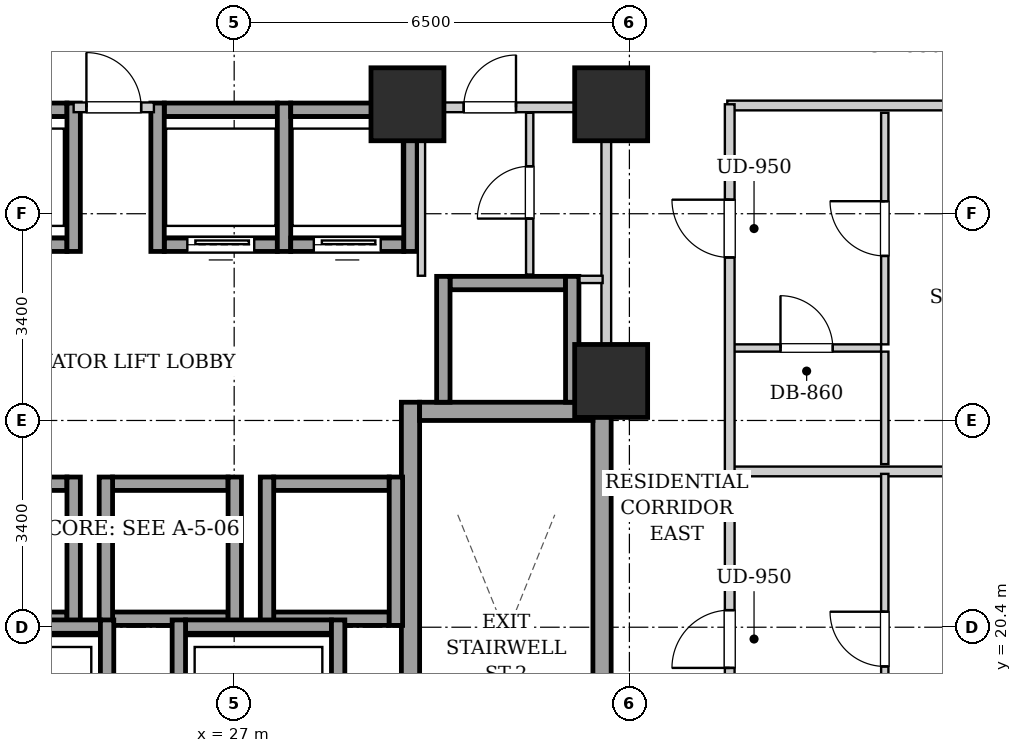
"""IFC4 building model, lengths in metres.
Left out: names, types, materials, properties, quantities, classifications, styles, units other than length and angle.
Written with IfcOpenShell. Run it as: python <this file> out.ifc"""

import sys

from ifc_helpers import new_model, si_unit, direction, frame, frame_2d, origin, origin_2d, place, context, subcontext, project, spatial, rectangle, extrude, element, fill, save


model = new_model("IFC4")
c1 = context("Model", 3, precision=1e-05, world=origin(), true_north=direction((0.0, 1.0)))
c2 = subcontext(c1, "Body", "Model", "MODEL_VIEW")
j1 = project(units=[si_unit("LENGTHUNIT", "METRE"), si_unit("PLANEANGLEUNIT", "RADIAN")], contexts=[c1])
p1 = place(None, origin())
s1 = spatial("IfcSite", under=j1, at=p1, CompositionType="ELEMENT")
p2 = place(p1, origin())
s2 = spatial("IfcBuilding", under=s1, at=p2, CompositionType="ELEMENT")
p3 = place(p2, frame((0.0, 0.0, 51.4)))
s3 = spatial("IfcBuildingStorey", under=s2, at=p3, CompositionType="ELEMENT", Elevation=51.4)
for number, where, z_axis, x_axis in (
    (1, (29.85, 29.0, 0.0), (0.0, 0.0, 1.0), (1.0, 0.0, 0.0)),
    (2, (33.2, 29.0, 0.0), (0.0, 0.0, 1.0), (1.0, 0.0, 0.0)),
    (3, (33.2, 24.45, 0.0), (0.0, 0.0, 1.0), (1.0, 0.0, 0.0)),
):
    element("IfcColumn", number, at=place(p3, frame(where, z_axis=z_axis, x_axis=x_axis)), inside=s3, PredefinedType="COLUMN", context=c2, shape_type="SweptSolid", body=[
        extrude(rectangle(XDim=1.2, YDim=1.2, at=origin_2d()), origin(), (0.0, 0.0, 1.0), 3.2),
    ])
for number, where, z_axis, x_axis in (
    (4, (29.9, 15.1, 0.0), (0.0, 0.0, 1.0), (0.0, 1.0, 0.0)),
    (5, (33.05, 15.1, 0.0), (0.0, 0.0, 1.0), (0.0, 1.0, 0.0)),
):
    element("IfcWall", number, at=place(p3, frame(where, z_axis=z_axis, x_axis=x_axis)), inside=s3, PredefinedType="SHEAR", context=c2, shape_type="SweptSolid", body=[
        extrude(rectangle(XDim=9.0, YDim=0.3, at=frame_2d((4.5, 0.0))), origin(), (0.0, 0.0, 1.0), 2.94),
    ])
p4 = place(p3, frame((30.05, 23.95, 0.0), z_axis=(0.0, 0.0, 1.0), x_axis=(1.0, 0.0, 0.0)))
e6 = element("IfcWall", 6, at=p4, inside=s3, PredefinedType="SHEAR", context=c2, shape_type="SweptSolid", body=[
    extrude(rectangle(XDim=2.85, YDim=0.3, at=frame_2d((1.425, 0.0))), origin(), (0.0, 0.0, 1.0), 2.94),
])
p5 = place(p3, frame((22.35, 26.69, 0.0), z_axis=(0.0, 0.0, 1.0), x_axis=(1.0, 0.0, 0.0)))
e7 = element("IfcWall", 7, at=p5, inside=s3, PredefinedType="SHEAR", context=c2, shape_type="SweptSolid", body=[
    extrude(rectangle(XDim=1.9, YDim=0.22, at=frame_2d((0.95, 0.0))), origin(), (0.0, 0.0, 1.0), 2.94),
])
p6 = place(p5, frame((0.4, 0.0, 0.0)))
e8 = element("IfcOpeningElement", 8, at=p6, cuts=e7, PredefinedType="OPENING", context=c2, shape_type="SweptSolid", body=[
    extrude(rectangle(XDim=1.1, YDim=2.15, at=frame_2d((0.55, 1.075))), frame((0.0, 0.12, 0.0), z_axis=(0.0, -1.0, 0.0), x_axis=(1.0, 0.0, 0.0)), (0.0, 0.0, 1.0), 0.24),
])
p7 = place(p3, frame((22.35, 28.91, 0.0), z_axis=(0.0, 0.0, 1.0), x_axis=(1.0, 0.0, 0.0)))
e9 = element("IfcWall", 9, at=p7, inside=s3, PredefinedType="SHEAR", context=c2, shape_type="SweptSolid", body=[
    extrude(rectangle(XDim=1.9, YDim=0.22, at=frame_2d((0.95, 0.0))), origin(), (0.0, 0.0, 1.0), 2.94),
])
p8 = place(p3, frame((24.36, 26.58, 0.0), z_axis=(0.0, 0.0, 1.0), x_axis=(0.0, 1.0, 0.0)))
e10 = element("IfcWall", 10, at=p8, inside=s3, PredefinedType="SHEAR", context=c2, shape_type="SweptSolid", body=[
    extrude(rectangle(XDim=2.44, YDim=0.22, at=frame_2d((1.22, 0.0))), origin(), (0.0, 0.0, 1.0), 2.94),
])
p9 = place(p3, frame((25.85, 26.69, 0.0), z_axis=(0.0, 0.0, 1.0), x_axis=(1.0, 0.0, 0.0)))
e11 = element("IfcWall", 11, at=p9, inside=s3, PredefinedType="SHEAR", context=c2, shape_type="SweptSolid", body=[
    extrude(rectangle(XDim=1.86, YDim=0.22, at=frame_2d((0.93, 0.0))), origin(), (0.0, 0.0, 1.0), 2.94),
])
p10 = place(p9, frame((0.38, 0.0, 0.0)))
e12 = element("IfcOpeningElement", 12, at=p10, cuts=e11, PredefinedType="OPENING", context=c2, shape_type="SweptSolid", body=[
    extrude(rectangle(XDim=1.1, YDim=2.15, at=frame_2d((0.55, 1.075))), frame((0.0, 0.12, 0.0), z_axis=(0.0, -1.0, 0.0), x_axis=(1.0, 0.0, 0.0)), (0.0, 0.0, 1.0), 0.24),
])
p11 = place(p3, frame((25.85, 28.91, 0.0), z_axis=(0.0, 0.0, 1.0), x_axis=(1.0, 0.0, 0.0)))
e13 = element("IfcWall", 13, at=p11, inside=s3, PredefinedType="SHEAR", context=c2, shape_type="SweptSolid", body=[
    extrude(rectangle(XDim=1.86, YDim=0.22, at=frame_2d((0.93, 0.0))), origin(), (0.0, 0.0, 1.0), 2.94),
])
for number, where, z_axis, x_axis in (
    (14, (25.74, 26.58, 0.0), (0.0, 0.0, 1.0), (0.0, 1.0, 0.0)),
    (15, (27.82, 26.58, 0.0), (0.0, 0.0, 1.0), (0.0, 1.0, 0.0)),
):
    element("IfcWall", number, at=place(p3, frame(where, z_axis=z_axis, x_axis=x_axis)), inside=s3, PredefinedType="SHEAR", context=c2, shape_type="SweptSolid", body=[
        extrude(rectangle(XDim=2.44, YDim=0.22, at=frame_2d((1.22, 0.0))), origin(), (0.0, 0.0, 1.0), 2.94),
    ])
p12 = place(p3, frame((27.93, 26.69, 0.0), z_axis=(0.0, 0.0, 1.0), x_axis=(1.0, 0.0, 0.0)))
e16 = element("IfcWall", 16, at=p12, inside=s3, PredefinedType="SHEAR", context=c2, shape_type="SweptSolid", body=[
    extrude(rectangle(XDim=1.86, YDim=0.22, at=frame_2d((0.93, 0.0))), origin(), (0.0, 0.0, 1.0), 2.94),
])
p13 = place(p12, frame((0.38, 0.0, 0.0)))
e17 = element("IfcOpeningElement", 17, at=p13, cuts=e16, PredefinedType="OPENING", context=c2, shape_type="SweptSolid", body=[
    extrude(rectangle(XDim=1.1, YDim=2.15, at=frame_2d((0.55, 1.075))), frame((0.0, 0.12, 0.0), z_axis=(0.0, -1.0, 0.0), x_axis=(1.0, 0.0, 0.0)), (0.0, 0.0, 1.0), 0.24),
])
p14 = place(p3, frame((27.93, 28.91, 0.0), z_axis=(0.0, 0.0, 1.0), x_axis=(1.0, 0.0, 0.0)))
e18 = element("IfcWall", 18, at=p14, inside=s3, PredefinedType="SHEAR", context=c2, shape_type="SweptSolid", body=[
    extrude(rectangle(XDim=1.86, YDim=0.22, at=frame_2d((0.93, 0.0))), origin(), (0.0, 0.0, 1.0), 2.94),
])
p15 = place(p3, frame((29.9, 26.58, 0.0), z_axis=(0.0, 0.0, 1.0), x_axis=(0.0, 1.0, 0.0)))
e19 = element("IfcWall", 19, at=p15, inside=s3, PredefinedType="SHEAR", context=c2, shape_type="SweptSolid", body=[
    extrude(rectangle(XDim=2.44, YDim=0.22, at=frame_2d((1.22, 0.0))), origin(), (0.0, 0.0, 1.0), 2.94),
])
for number, where, z_axis, x_axis in (
    (20, (22.35, 20.54, 0.0), (0.0, 0.0, 1.0), (1.0, 0.0, 0.0)),
    (21, (22.35, 22.76, 0.0), (0.0, 0.0, 1.0), (1.0, 0.0, 0.0)),
):
    element("IfcWall", number, at=place(p3, frame(where, z_axis=z_axis, x_axis=x_axis)), inside=s3, PredefinedType="SHEAR", context=c2, shape_type="SweptSolid", body=[
        extrude(rectangle(XDim=1.9, YDim=0.22, at=frame_2d((0.95, 0.0))), origin(), (0.0, 0.0, 1.0), 2.94),
    ])
p16 = place(p3, frame((24.36, 20.43, 0.0), z_axis=(0.0, 0.0, 1.0), x_axis=(0.0, 1.0, 0.0)))
e22 = element("IfcWall", 22, at=p16, inside=s3, PredefinedType="SHEAR", context=c2, shape_type="SweptSolid", body=[
    extrude(rectangle(XDim=2.44, YDim=0.22, at=frame_2d((1.22, 0.0))), origin(), (0.0, 0.0, 1.0), 2.94),
])
for number, where, z_axis, x_axis in (
    (23, (25.0, 20.54, 0.0), (0.0, 0.0, 1.0), (1.0, 0.0, 0.0)),
    (24, (25.0, 22.76, 0.0), (0.0, 0.0, 1.0), (1.0, 0.0, 0.0)),
):
    element("IfcWall", number, at=place(p3, frame(where, z_axis=z_axis, x_axis=x_axis)), inside=s3, PredefinedType="SHEAR", context=c2, shape_type="SweptSolid", body=[
        extrude(rectangle(XDim=1.9, YDim=0.22, at=frame_2d((0.95, 0.0))), origin(), (0.0, 0.0, 1.0), 2.94),
    ])
for number, where, z_axis, x_axis in (
    (25, (24.89, 20.43, 0.0), (0.0, 0.0, 1.0), (0.0, 1.0, 0.0)),
    (26, (27.01, 20.43, 0.0), (0.0, 0.0, 1.0), (0.0, 1.0, 0.0)),
):
    element("IfcWall", number, at=place(p3, frame(where, z_axis=z_axis, x_axis=x_axis)), inside=s3, PredefinedType="SHEAR", context=c2, shape_type="SweptSolid", body=[
        extrude(rectangle(XDim=2.44, YDim=0.22, at=frame_2d((1.22, 0.0))), origin(), (0.0, 0.0, 1.0), 2.94),
    ])
for number, where, z_axis, x_axis in (
    (27, (27.65, 20.54, 0.0), (0.0, 0.0, 1.0), (1.0, 0.0, 0.0)),
    (28, (27.65, 22.76, 0.0), (0.0, 0.0, 1.0), (1.0, 0.0, 0.0)),
):
    element("IfcWall", number, at=place(p3, frame(where, z_axis=z_axis, x_axis=x_axis)), inside=s3, PredefinedType="SHEAR", context=c2, shape_type="SweptSolid", body=[
        extrude(rectangle(XDim=1.9, YDim=0.22, at=frame_2d((0.95, 0.0))), origin(), (0.0, 0.0, 1.0), 2.94),
    ])
for number, where, z_axis, x_axis in (
    (29, (27.54, 20.43, 0.0), (0.0, 0.0, 1.0), (0.0, 1.0, 0.0)),
    (30, (29.66, 20.43, 0.0), (0.0, 0.0, 1.0), (0.0, 1.0, 0.0)),
):
    element("IfcWall", number, at=place(p3, frame(where, z_axis=z_axis, x_axis=x_axis)), inside=s3, PredefinedType="SHEAR", context=c2, shape_type="SweptSolid", body=[
        extrude(rectangle(XDim=2.44, YDim=0.22, at=frame_2d((1.22, 0.0))), origin(), (0.0, 0.0, 1.0), 2.94),
    ])
p17 = place(p3, frame((30.55, 26.06, 0.0), z_axis=(0.0, 0.0, 1.0), x_axis=(1.0, 0.0, 0.0)))
e31 = element("IfcWall", 31, at=p17, inside=s3, PredefinedType="SHEAR", context=c2, shape_type="SweptSolid", body=[
    extrude(rectangle(XDim=1.9, YDim=0.22, at=frame_2d((0.95, 0.0))), origin(), (0.0, 0.0, 1.0), 2.94),
])
for number, where, z_axis, x_axis in (
    (32, (30.44, 24.1, 0.0), (0.0, 0.0, 1.0), (0.0, 1.0, 0.0)),
    (33, (32.56, 24.1, 0.0), (0.0, 0.0, 1.0), (0.0, 1.0, 0.0)),
):
    element("IfcWall", number, at=place(p3, frame(where, z_axis=z_axis, x_axis=x_axis)), inside=s3, PredefinedType="SHEAR", context=c2, shape_type="SweptSolid", body=[
        extrude(rectangle(XDim=2.07, YDim=0.22, at=frame_2d((1.035, 0.0))), origin(), (0.0, 0.0, 1.0), 2.94),
    ])
p18 = place(p3, frame((22.4, 20.41, 0.0), z_axis=(0.0, 0.0, 1.0), x_axis=(1.0, 0.0, 0.0)))
e34 = element("IfcWall", 34, at=p18, inside=s3, PredefinedType="SHEAR", context=c2, shape_type="SweptSolid", body=[
    extrude(rectangle(XDim=2.4, YDim=0.22, at=frame_2d((1.2, 0.0))), origin(), (0.0, 0.0, 1.0), 2.94),
])
p19 = place(p3, frame((24.91, 17.98, 0.0), z_axis=(0.0, 0.0, 1.0), x_axis=(0.0, 1.0, 0.0)))
e35 = element("IfcWall", 35, at=p19, inside=s3, PredefinedType="SHEAR", context=c2, shape_type="SweptSolid", body=[
    extrude(rectangle(XDim=2.54, YDim=0.22, at=frame_2d((1.27, 0.0))), origin(), (0.0, 0.0, 1.0), 2.94),
])
p20 = place(p3, frame((26.2, 20.41, 0.0), z_axis=(0.0, 0.0, 1.0), x_axis=(1.0, 0.0, 0.0)))
e36 = element("IfcWall", 36, at=p20, inside=s3, PredefinedType="SHEAR", context=c2, shape_type="SweptSolid", body=[
    extrude(rectangle(XDim=2.4, YDim=0.22, at=frame_2d((1.2, 0.0))), origin(), (0.0, 0.0, 1.0), 2.94),
])
for number, where, z_axis, x_axis in (
    (37, (26.09, 17.98, 0.0), (0.0, 0.0, 1.0), (0.0, 1.0, 0.0)),
    (38, (28.71, 17.98, 0.0), (0.0, 0.0, 1.0), (0.0, 1.0, 0.0)),
):
    element("IfcWall", number, at=place(p3, frame(where, z_axis=z_axis, x_axis=x_axis)), inside=s3, PredefinedType="SHEAR", context=c2, shape_type="SweptSolid", body=[
        extrude(rectangle(XDim=2.54, YDim=0.22, at=frame_2d((1.27, 0.0))), origin(), (0.0, 0.0, 1.0), 2.94),
    ])
p21 = place(p3, frame((33.12, 24.12, 0.0), z_axis=(0.0, 0.0, 1.0), x_axis=(0.0, 1.0, 0.0)))
e39 = element("IfcWall", 39, at=p21, inside=s3, PredefinedType="PARTITIONING", context=c2, shape_type="SweptSolid", body=[
    extrude(rectangle(XDim=4.76, YDim=0.16, at=frame_2d((2.38, 0.0))), origin(), (0.0, 0.0, 1.0), 2.94),
])
p22 = place(p3, frame((24.36, 28.95, 0.0), z_axis=(0.0, 0.0, 1.0), x_axis=(1.0, 0.0, 0.0)))
e40 = element("IfcWall", 40, at=p22, inside=s3, PredefinedType="PARTITIONING", context=c2, shape_type="SweptSolid", body=[
    extrude(rectangle(XDim=1.32, YDim=0.16, at=frame_2d((0.66, 0.0))), origin(), (0.0, 0.0, 1.0), 2.232),
])
p23 = place(p22, frame((0.21, 0.0, 0.0)))
e41 = element("IfcOpeningElement", 41, at=p23, cuts=e40, PredefinedType="OPENING", context=c2, shape_type="SweptSolid", body=[
    extrude(rectangle(XDim=0.9, YDim=2.05, at=frame_2d((0.45, 1.025))), frame((0.0, 0.09, 0.0), z_axis=(0.0, -1.0, 0.0), x_axis=(1.0, 0.0, 0.0)), (0.0, 0.0, 1.0), 0.18),
])
p24 = place(p3, frame((30.08, 26.18, 0.0), z_axis=(0.0, 0.0, 1.0), x_axis=(0.0, 1.0, 0.0)))
e42 = element("IfcWall", 42, at=p24, inside=s3, PredefinedType="PARTITIONING", context=c2, shape_type="SweptSolid", body=[
    extrude(rectangle(XDim=2.68, YDim=0.12, at=frame_2d((1.34, 0.0))), origin(), (0.0, 0.0, 1.0), 2.94),
])
p25 = place(p3, frame((32.68, 26.12, 0.0), z_axis=(0.0, 0.0, 1.0), x_axis=(1.0, 0.0, 0.0)))
e43 = element("IfcWall", 43, at=p25, inside=s3, PredefinedType="PARTITIONING", context=c2, shape_type="SweptSolid", body=[
    extrude(rectangle(XDim=0.38, YDim=0.12, at=frame_2d((0.19, 0.0))), origin(), (0.0, 0.0, 1.0), 2.94),
])
p26 = place(p3, frame((31.86, 26.2, 0.0), z_axis=(0.0, 0.0, 1.0), x_axis=(0.0, 1.0, 0.0)))
e44 = element("IfcWall", 44, at=p26, inside=s3, PredefinedType="PARTITIONING", context=c2, shape_type="SweptSolid", body=[
    extrude(rectangle(XDim=2.66, YDim=0.12, at=frame_2d((1.33, 0.0))), origin(), (0.0, 0.0, 1.0), 2.94),
])
p27 = place(p26, frame((0.92, 0.0, 0.0)))
e45 = element("IfcOpeningElement", 45, at=p27, cuts=e44, PredefinedType="OPENING", context=c2, shape_type="SweptSolid", body=[
    extrude(rectangle(XDim=0.86, YDim=2.05, at=frame_2d((0.43, 1.025))), frame((0.0, 0.07, 0.0), z_axis=(0.0, -1.0, 0.0), x_axis=(1.0, 0.0, 0.0)), (0.0, 0.0, 1.0), 0.14),
])
p28 = place(p3, frame((30.08, 28.95, 0.0), z_axis=(0.0, 0.0, 1.0), x_axis=(1.0, 0.0, 0.0)))
e46 = element("IfcWall", 46, at=p28, inside=s3, PredefinedType="PARTITIONING", context=c2, shape_type="SweptSolid", body=[
    extrude(rectangle(XDim=2.96, YDim=0.16, at=frame_2d((1.48, 0.0))), origin(), (0.0, 0.0, 1.0), 2.94),
])
p29 = place(p28, frame((0.695, 0.0, 0.0)))
e47 = element("IfcOpeningElement", 47, at=p29, cuts=e46, PredefinedType="OPENING", context=c2, shape_type="SweptSolid", body=[
    extrude(rectangle(XDim=0.86, YDim=2.05, at=frame_2d((0.43, 1.025))), frame((0.0, 0.09, 0.0), z_axis=(0.0, -1.0, 0.0), x_axis=(1.0, 0.0, 0.0)), (0.0, 0.0, 1.0), 0.18),
])
p30 = place(p3, frame((35.11, 28.98, 0.0), z_axis=(0.0, 0.0, 1.0), x_axis=(1.0, 0.0, 0.0)))
e48 = element("IfcWall", 48, at=p30, inside=s3, PredefinedType="PARTITIONING", context=c2, shape_type="SweptSolid", body=[
    extrude(rectangle(XDim=11.11, YDim=0.16, at=frame_2d((5.555, 0.0))), origin(), (0.0, 0.0, 1.0), 2.232),
])
p31 = place(p3, frame((35.19, 22.962, 0.0), z_axis=(0.0, 0.0, 1.0), x_axis=(1.0, 0.0, 0.0)))
e49 = element("IfcWall", 49, at=p31, inside=s3, PredefinedType="PARTITIONING", context=c2, shape_type="SweptSolid", body=[
    extrude(rectangle(XDim=11.03, YDim=0.16, at=frame_2d((5.515, 0.0))), origin(), (0.0, 0.0, 1.0), 2.94),
])
p32 = place(p3, frame((37.7, 17.489, 0.0), z_axis=(0.0, 0.0, 1.0), x_axis=(0.0, 1.0, 0.0)))
e50 = element("IfcWall", 50, at=p32, inside=s3, PredefinedType="PARTITIONING", context=c2, shape_type="SweptSolid", body=[
    extrude(rectangle(XDim=5.433, YDim=0.12, at=frame_2d((2.717, 0.0))), origin(), (0.0, 0.0, 1.0), 2.94),
])
p33 = place(p32, frame((2.266, 0.0, 0.0)))
e51 = element("IfcOpeningElement", 51, at=p33, cuts=e50, PredefinedType="OPENING", context=c2, shape_type="SweptSolid", body=[
    extrude(rectangle(XDim=0.9, YDim=2.05, at=frame_2d((0.45, 1.025))), frame((0.0, 0.07, 0.0), z_axis=(0.0, -1.0, 0.0), x_axis=(1.0, 0.0, 0.0)), (0.0, 0.0, 1.0), 0.14),
])
p34 = place(p3, frame((35.19, 24.992, 0.0), z_axis=(0.0, 0.0, 1.0), x_axis=(1.0, 0.0, 0.0)))
e52 = element("IfcWall", 52, at=p34, inside=s3, PredefinedType="PARTITIONING", context=c2, shape_type="SweptSolid", body=[
    extrude(rectangle(XDim=2.45, YDim=0.12, at=frame_2d((1.225, 0.0))), origin(), (0.0, 0.0, 1.0), 2.94),
])
p35 = place(p34, frame((0.795, 0.0, 0.0)))
e53 = element("IfcOpeningElement", 53, at=p35, cuts=e52, PredefinedType="OPENING", context=c2, shape_type="SweptSolid", body=[
    extrude(rectangle(XDim=0.86, YDim=2.05, at=frame_2d((0.43, 1.025))), frame((0.0, 0.07, 0.0), z_axis=(0.0, -1.0, 0.0), x_axis=(1.0, 0.0, 0.0)), (0.0, 0.0, 1.0), 0.14),
])
p36 = place(p3, frame((37.7, 23.082, 0.0), z_axis=(0.0, 0.0, 1.0), x_axis=(0.0, 1.0, 0.0)))
e54 = element("IfcWall", 54, at=p36, inside=s3, PredefinedType="PARTITIONING", context=c2, shape_type="SweptSolid", body=[
    extrude(rectangle(XDim=1.85, YDim=0.12, at=frame_2d((0.925, 0.0))), origin(), (0.0, 0.0, 1.0), 2.94),
])
p37 = place(p3, frame((37.7, 25.052, 0.0), z_axis=(0.0, 0.0, 1.0), x_axis=(0.0, 1.0, 0.0)))
e55 = element("IfcWall", 55, at=p37, inside=s3, PredefinedType="PARTITIONING", context=c2, shape_type="SweptSolid", body=[
    extrude(rectangle(XDim=3.808, YDim=0.12, at=frame_2d((1.904, 0.0))), origin(), (0.0, 0.0, 1.0), 2.94),
])
p38 = place(p37, frame((1.454, 0.0, 0.0)))
e56 = element("IfcOpeningElement", 56, at=p38, cuts=e55, PredefinedType="OPENING", context=c2, shape_type="SweptSolid", body=[
    extrude(rectangle(XDim=0.9, YDim=2.05, at=frame_2d((0.45, 1.025))), frame((0.0, 0.07, 0.0), z_axis=(0.0, -1.0, 0.0), x_axis=(1.0, 0.0, 0.0)), (0.0, 0.0, 1.0), 0.14),
])
p39 = place(p3, frame((35.15, 15.07, 0.0), z_axis=(0.0, 0.0, 1.0), x_axis=(0.0, 1.0, 0.0)))
e57 = element("IfcWall", 57, at=p39, inside=s3, PredefinedType="PARTITIONING", context=c2, shape_type="SweptSolid", body=[
    extrude(rectangle(XDim=13.93, YDim=0.16, at=frame_2d((6.965, 0.0))), origin(), (0.0, 0.0, 1.0), 2.94),
])
p40 = place(p39, frame((4.661, 0.0, 0.0)))
e58 = element("IfcOpeningElement", 58, at=p40, cuts=e57, PredefinedType="OPENING", context=c2, shape_type="SweptSolid", body=[
    extrude(rectangle(XDim=0.95, YDim=2.1, at=frame_2d((0.475, 1.05))), frame((0.0, 0.09, 0.0), z_axis=(0.0, -1.0, 0.0), x_axis=(1.0, 0.0, 0.0)), (0.0, 0.0, 1.0), 0.18),
])
p41 = place(p39, frame((11.411, 0.0, 0.0)))
e59 = element("IfcOpeningElement", 59, at=p41, cuts=e57, PredefinedType="OPENING", context=c2, shape_type="SweptSolid", body=[
    extrude(rectangle(XDim=0.95, YDim=2.1, at=frame_2d((0.475, 1.05))), frame((0.0, 0.09, 0.0), z_axis=(0.0, -1.0, 0.0), x_axis=(1.0, 0.0, 0.0)), (0.0, 0.0, 1.0), 0.18),
])
p42 = place(p10, origin())
e60 = element("IfcDoor", 60, at=p42, inside=s3, OperationType="SLIDING_TO_LEFT", PredefinedType="DOOR", context=c2, shape_type="SweptSolid", body=[
    extrude(rectangle(XDim=1.1, YDim=2.15, at=frame_2d((0.55, 1.075))), frame((0.0, 0.025, 0.0), z_axis=(0.0, -1.0, 0.0), x_axis=(1.0, 0.0, 0.0)), (0.0, 0.0, 1.0), 0.05),
])
fill(e12, e60)
p43 = place(p13, origin())
e61 = element("IfcDoor", 61, at=p43, inside=s3, OperationType="SLIDING_TO_LEFT", PredefinedType="DOOR", context=c2, shape_type="SweptSolid", body=[
    extrude(rectangle(XDim=1.1, YDim=2.15, at=frame_2d((0.55, 1.075))), frame((0.0, 0.025, 0.0), z_axis=(0.0, -1.0, 0.0), x_axis=(1.0, 0.0, 0.0)), (0.0, 0.0, 1.0), 0.05),
])
fill(e17, e61)
p44 = place(p23, origin())
e62 = element("IfcDoor", 62, at=p44, inside=s3, OperationType="SINGLE_SWING_LEFT", PredefinedType="DOOR", context=c2, shape_type="SweptSolid", body=[
    extrude(rectangle(XDim=0.9, YDim=2.05, at=frame_2d((0.45, 1.025))), frame((0.0, 0.025, 0.0), z_axis=(0.0, -1.0, 0.0), x_axis=(1.0, 0.0, 0.0)), (0.0, 0.0, 1.0), 0.05),
])
fill(e41, e62)
p45 = place(p27, origin())
e63 = element("IfcDoor", 63, at=p45, inside=s3, OperationType="SINGLE_SWING_LEFT", PredefinedType="DOOR", context=c2, shape_type="SweptSolid", body=[
    extrude(rectangle(XDim=0.86, YDim=2.05, at=frame_2d((0.43, 1.025))), frame((0.0, 0.025, 0.0), z_axis=(0.0, -1.0, 0.0), x_axis=(1.0, 0.0, 0.0)), (0.0, 0.0, 1.0), 0.05),
])
fill(e45, e63)
p46 = place(p29, origin())
e64 = element("IfcDoor", 64, at=p46, inside=s3, OperationType="SINGLE_SWING_RIGHT", PredefinedType="DOOR", context=c2, shape_type="SweptSolid", body=[
    extrude(rectangle(XDim=0.86, YDim=2.05, at=frame_2d((0.43, 1.025))), frame((0.0, 0.025, 0.0), z_axis=(0.0, -1.0, 0.0), x_axis=(1.0, 0.0, 0.0)), (0.0, 0.0, 1.0), 0.05),
])
fill(e47, e64)
p47 = place(p33, origin())
e65 = element("IfcDoor", 65, at=p47, inside=s3, OperationType="SINGLE_SWING_RIGHT", PredefinedType="DOOR", context=c2, shape_type="SweptSolid", body=[
    extrude(rectangle(XDim=0.9, YDim=2.05, at=frame_2d((0.45, 1.025))), frame((0.0, 0.025, 0.0), z_axis=(0.0, -1.0, 0.0), x_axis=(1.0, 0.0, 0.0)), (0.0, 0.0, 1.0), 0.05),
])
fill(e51, e65)
p48 = place(p35, origin())
e66 = element("IfcDoor", 66, at=p48, inside=s3, OperationType="SINGLE_SWING_LEFT", PredefinedType="DOOR", context=c2, shape_type="SweptSolid", body=[
    extrude(rectangle(XDim=0.86, YDim=2.05, at=frame_2d((0.43, 1.025))), frame((0.0, 0.025, 0.0), z_axis=(0.0, -1.0, 0.0), x_axis=(1.0, 0.0, 0.0)), (0.0, 0.0, 1.0), 0.05),
])
fill(e53, e66)
p49 = place(p38, origin())
e67 = element("IfcDoor", 67, at=p49, inside=s3, OperationType="SINGLE_SWING_RIGHT", PredefinedType="DOOR", context=c2, shape_type="SweptSolid", body=[
    extrude(rectangle(XDim=0.9, YDim=2.05, at=frame_2d((0.45, 1.025))), frame((0.0, 0.025, 0.0), z_axis=(0.0, -1.0, 0.0), x_axis=(1.0, 0.0, 0.0)), (0.0, 0.0, 1.0), 0.05),
])
fill(e56, e67)
p50 = place(p40, origin())
e68 = element("IfcDoor", 68, at=p50, inside=s3, OperationType="SINGLE_SWING_LEFT", PredefinedType="DOOR", context=c2, shape_type="SweptSolid", body=[
    extrude(rectangle(XDim=0.95, YDim=2.1, at=frame_2d((0.475, 1.05))), frame((0.0, 0.025, 0.0), z_axis=(0.0, -1.0, 0.0), x_axis=(1.0, 0.0, 0.0)), (0.0, 0.0, 1.0), 0.05),
])
fill(e58, e68)
p51 = place(p41, origin())
e69 = element("IfcDoor", 69, at=p51, inside=s3, OperationType="SINGLE_SWING_RIGHT", PredefinedType="DOOR", context=c2, shape_type="SweptSolid", body=[
    extrude(rectangle(XDim=0.95, YDim=2.1, at=frame_2d((0.475, 1.05))), frame((0.0, 0.025, 0.0), z_axis=(0.0, -1.0, 0.0), x_axis=(1.0, 0.0, 0.0)), (0.0, 0.0, 1.0), 0.05),
])
fill(e59, e69)
save(model, sys.argv[1])
